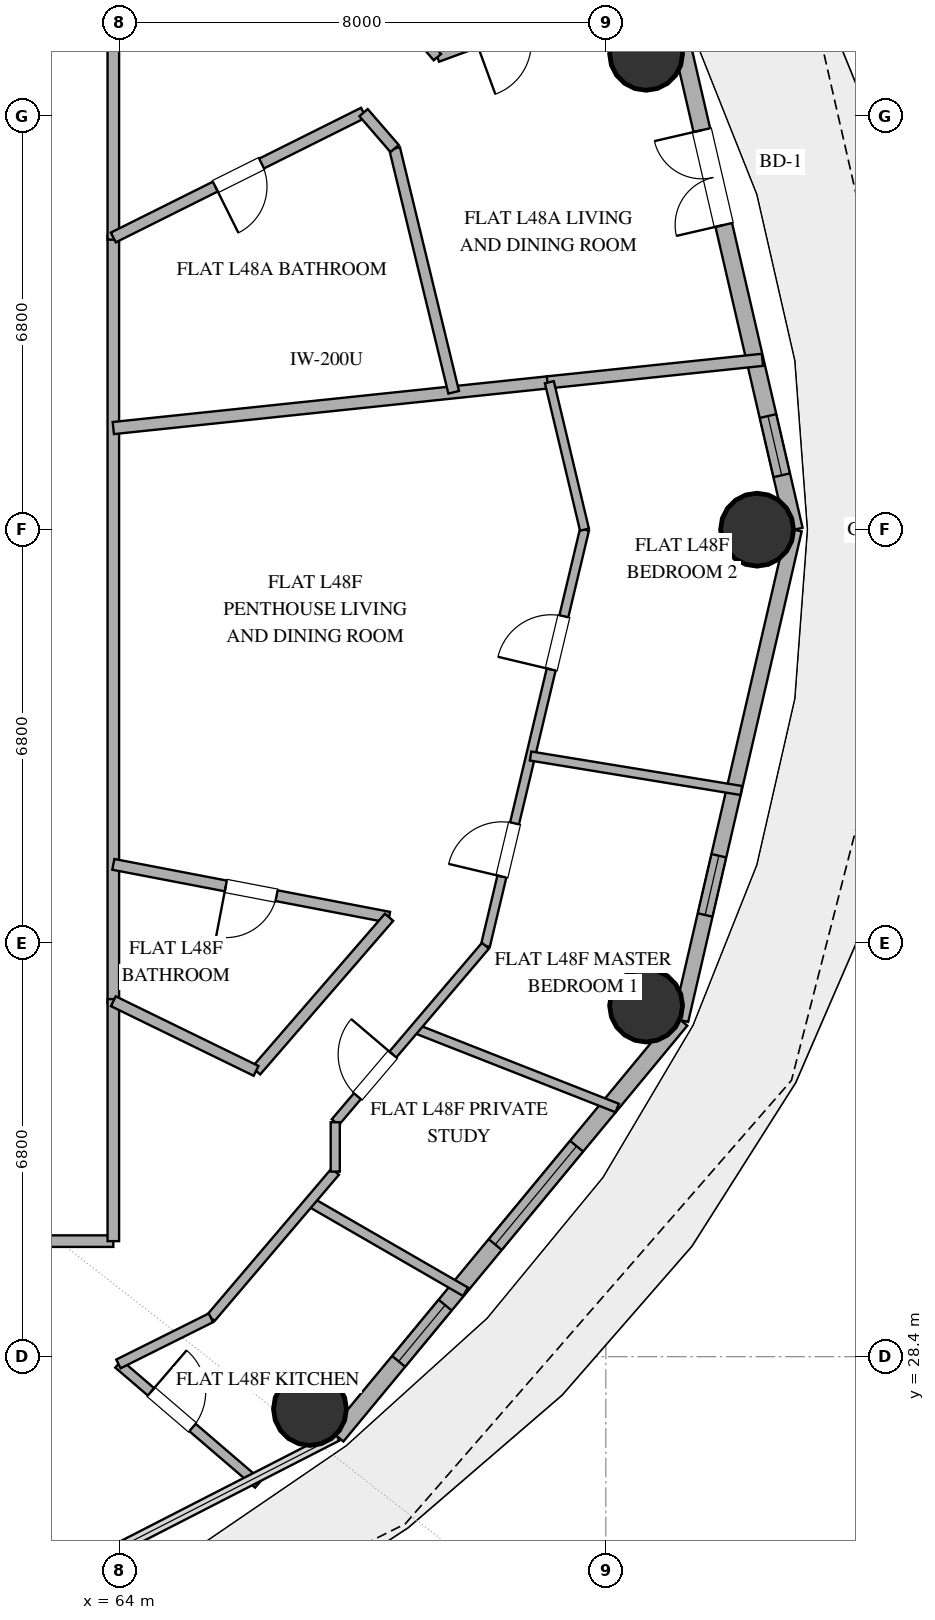
"""IFC4 building model, lengths in metres.
Left out: names, types, materials, properties, quantities, classifications, styles, units other than length and angle.
Written with IfcOpenShell. Run it as: python <this file> out.ifc"""

import sys

from ifc_helpers import new_model, si_unit, direction, frame, frame_2d, origin, origin_2d, place, context, subcontext, project, spatial, rectangle, hollow_circle, extrude, element, fill, save


model = new_model("IFC4")
c1 = context("Model", 3, precision=1e-05, world=origin(), true_north=direction((0.0, 1.0)))
c2 = subcontext(c1, "Body", "Model", "MODEL_VIEW")
j1 = project(units=[si_unit("LENGTHUNIT", "METRE"), si_unit("PLANEANGLEUNIT", "RADIAN")], contexts=[c1])
p1 = place(None, origin())
s1 = spatial("IfcSite", under=j1, at=p1, CompositionType="ELEMENT")
p2 = place(p1, origin())
s2 = spatial("IfcBuilding", under=s1, at=p2, CompositionType="ELEMENT")
p3 = place(p2, frame((0.0, 0.0, 190.2)))
s3 = spatial("IfcBuildingStorey", under=s2, at=p3, CompositionType="ELEMENT", Elevation=190.2)
for number, where, z_axis, x_axis in (
    (1, (74.487, 42.0, 0.0), (0.0, 0.0, 1.0), (1.0, 0.0, 0.0)),
    (2, (72.662, 49.826, 0.0), (0.0, 0.0, 1.0), (1.0, 0.0, 0.0)),
    (3, (67.134, 27.54, 0.0), (0.0, 0.0, 1.0), (1.0, 0.0, 0.0)),
    (4, (72.662, 34.174, 0.0), (0.0, 0.0, 1.0), (1.0, 0.0, 0.0)),
):
    element("IfcColumn", number, at=place(p3, frame(where, z_axis=z_axis, x_axis=x_axis)), inside=s3, PredefinedType="COLUMN", context=c2, shape_type="SweptSolid", body=[
        extrude(hollow_circle(Radius=0.6, WallThickness=0.032, at=origin_2d()), origin(), (0.0, 0.0, 1.0), 3.38),
    ])
p4 = place(p3, frame((75.099, 42.0, 0.0), z_axis=(0.0, 0.0, 1.0), x_axis=(-0.225473184558, 0.974249374157, 0.0)))
e5 = element("IfcWall", 5, at=p4, inside=s3, PredefinedType="SOLIDWALL", context=c2, shape_type="SweptSolid", body=[
    extrude(rectangle(XDim=8.28, YDim=0.28, at=frame_2d((4.14, 0.0))), origin(), (0.0, 0.0, 1.0), 3.38),
])
p5 = place(p4, frame((5.144, 0.0, 0.0)))
e6 = element("IfcOpeningElement", 6, at=p5, cuts=e5, PredefinedType="OPENING", context=c2, shape_type="SweptSolid", body=[
    extrude(rectangle(XDim=1.6, YDim=2.25, at=frame_2d((0.8, 1.125))), frame((0.0, 0.15, 0.0), z_axis=(0.0, -1.0, 0.0), x_axis=(1.0, 0.0, 0.0)), (0.0, 0.0, 1.0), 0.3),
])
p6 = place(p4, frame((0.918, 0.0, 0.85)))
e7 = element("IfcOpeningElement", 7, at=p6, cuts=e5, PredefinedType="OPENING", context=c2, shape_type="SweptSolid", body=[
    extrude(rectangle(XDim=1.0, YDim=1.8, at=frame_2d((0.5, 0.9))), frame((0.0, 0.15, 0.0), z_axis=(0.0, -1.0, 0.0), x_axis=(1.0, 0.0, 0.0)), (0.0, 0.0, 1.0), 0.3),
])
p7 = place(p3, frame((67.576, 27.094, 0.0), z_axis=(0.0, 0.0, 1.0), x_axis=(0.637333477683, 0.770588111915, 0.0)))
e8 = element("IfcWall", 8, at=p7, inside=s3, PredefinedType="SOLIDWALL", context=c2, shape_type="SweptSolid", body=[
    extrude(rectangle(XDim=8.875, YDim=0.28, at=frame_2d((4.438, 0.0))), origin(), (0.0, 0.0, 1.0), 3.38),
])
p8 = place(p7, frame((1.594, 0.0, 0.85)))
e9 = element("IfcOpeningElement", 9, at=p8, cuts=e8, PredefinedType="OPENING", context=c2, shape_type="SweptSolid", body=[
    extrude(rectangle(XDim=1.2, YDim=1.6, at=frame_2d((0.6, 0.8))), frame((0.0, 0.15, 0.0), z_axis=(0.0, -1.0, 0.0), x_axis=(1.0, 0.0, 0.0)), (0.0, 0.0, 1.0), 0.3),
])
p9 = place(p7, frame((4.087, 0.0, 0.85)))
e10 = element("IfcOpeningElement", 10, at=p9, cuts=e8, PredefinedType="OPENING", context=c2, shape_type="SweptSolid", body=[
    extrude(rectangle(XDim=2.1, YDim=2.2, at=frame_2d((1.05, 1.1))), frame((0.0, 0.15, 0.0), z_axis=(0.0, -1.0, 0.0), x_axis=(1.0, 0.0, 0.0)), (0.0, 0.0, 1.0), 0.3),
])
p10 = place(p3, frame((73.232, 33.933, 0.0), z_axis=(0.0, 0.0, 1.0), x_axis=(0.225473184558, 0.974249374157, 0.0)))
e11 = element("IfcWall", 11, at=p10, inside=s3, PredefinedType="SOLIDWALL", context=c2, shape_type="SweptSolid", body=[
    extrude(rectangle(XDim=8.28, YDim=0.25, at=frame_2d((4.14, 0.0))), origin(), (0.0, 0.0, 1.0), 3.38),
])
p11 = place(p10, frame((1.776, 0.0, 1.42)))
e12 = element("IfcOpeningElement", 12, at=p11, cuts=e11, PredefinedType="OPENING", context=c2, shape_type="SweptSolid", body=[
    extrude(rectangle(XDim=1.0, YDim=1.05, at=frame_2d((0.5, 0.525))), frame((0.0, 0.135, 0.0), z_axis=(0.0, -1.0, 0.0), x_axis=(1.0, 0.0, 0.0)), (0.0, 0.0, 1.0), 0.27),
])
p12 = place(p3, frame((41.743, 30.3, 0.0), z_axis=(0.0, 0.0, 1.0), x_axis=(1.0, 0.0, 0.0)))
e13 = element("IfcWall", 13, at=p12, inside=s3, PredefinedType="PARTITIONING", context=c2, shape_type="SweptSolid", body=[
    extrude(rectangle(XDim=22.157, YDim=0.19, at=frame_2d((11.079, 0.0))), origin(), (0.0, 0.0, 1.0), 2.74),
])
p13 = place(p12, frame((7.451, 0.0, 0.0)))
e14 = element("IfcOpeningElement", 14, at=p13, cuts=e13, PredefinedType="OPENING", context=c2, shape_type="SweptSolid", body=[
    extrude(rectangle(XDim=1.0, YDim=2.2, at=frame_2d((0.5, 1.1))), frame((0.0, 0.105, 0.0), z_axis=(0.0, -1.0, 0.0), x_axis=(1.0, 0.0, 0.0)), (0.0, 0.0, 1.0), 0.21),
])
p14 = place(p12, frame((17.344, 0.0, 0.0)))
e15 = element("IfcOpeningElement", 15, at=p14, cuts=e13, PredefinedType="OPENING", context=c2, shape_type="SweptSolid", body=[
    extrude(rectangle(XDim=1.0, YDim=2.2, at=frame_2d((0.5, 1.1))), frame((0.0, 0.105, 0.0), z_axis=(0.0, -1.0, 0.0), x_axis=(1.0, 0.0, 0.0)), (0.0, 0.0, 1.0), 0.21),
])
p15 = place(p3, frame((63.9, 46.841, 0.0), z_axis=(0.0, 0.0, 1.0), x_axis=(0.0, -1.0, 0.0)))
e16 = element("IfcWall", 16, at=p15, inside=s3, PredefinedType="PARTITIONING", context=c2, shape_type="SweptSolid", body=[
    extrude(rectangle(XDim=12.632, YDim=0.19, at=frame_2d((6.316, 0.0))), origin(), (0.0, 0.0, 1.0), 2.74),
])
p16 = place(p3, frame((63.9, 53.7, 0.0), z_axis=(0.0, 0.0, 1.0), x_axis=(0.0, -1.0, 0.0)))
e17 = element("IfcWall", 17, at=p16, inside=s3, PredefinedType="PARTITIONING", context=c2, shape_type="SweptSolid", body=[
    extrude(rectangle(XDim=6.931, YDim=0.19, at=frame_2d((3.465, 0.0))), origin(), (0.0, 0.0, 1.0), 2.74),
])
p17 = place(p3, frame((63.9, 43.671, 0.0), z_axis=(0.0, 0.0, 1.0), x_axis=(0.994523063153, 0.104517351942, 0.0)))
e18 = element("IfcWall", 18, at=p17, inside=s3, PredefinedType="PARTITIONING", context=c2, shape_type="SweptSolid", body=[
    extrude(rectangle(XDim=7.211, YDim=0.2, at=frame_2d((3.605, 0.0))), origin(), (0.0, 0.0, 1.0), 2.74),
])
p18 = place(p3, frame((68.435, 35.626, 0.0), z_axis=(0.0, 0.0, 1.0), x_axis=(-0.982105494501, 0.188331616227, 0.0)))
e19 = element("IfcWall", 19, at=p18, inside=s3, PredefinedType="PLUMBINGWALL", context=c2, shape_type="SweptSolid", body=[
    extrude(rectangle(XDim=4.617, YDim=0.18, at=frame_2d((2.309, 0.0))), origin(), (0.0, 0.0, 1.0), 2.74),
])
p19 = place(p18, frame((1.884, 0.0, 0.0)))
e20 = element("IfcOpeningElement", 20, at=p19, cuts=e19, PredefinedType="OPENING", context=c2, shape_type="SweptSolid", body=[
    extrude(rectangle(XDim=0.85, YDim=2.1, at=frame_2d((0.425, 1.05))), frame((0.0, 0.1, 0.0), z_axis=(0.0, -1.0, 0.0), x_axis=(1.0, 0.0, 0.0)), (0.0, 0.0, 1.0), 0.2),
])
p20 = place(p3, frame((68.016, 48.858, 0.0), z_axis=(0.0, 0.0, 1.0), x_axis=(-0.894872643331, -0.446321579377, 0.0)))
e21 = element("IfcWall", 21, at=p20, inside=s3, PredefinedType="PLUMBINGWALL", context=c2, shape_type="SweptSolid", body=[
    extrude(rectangle(XDim=4.599, YDim=0.18, at=frame_2d((2.3, 0.0))), origin(), (0.0, 0.0, 1.0), 2.74),
])
p21 = place(p20, frame((1.875, 0.0, 0.0)))
e22 = element("IfcOpeningElement", 22, at=p21, cuts=e21, PredefinedType="OPENING", context=c2, shape_type="SweptSolid", body=[
    extrude(rectangle(XDim=0.85, YDim=2.1, at=frame_2d((0.425, 1.05))), frame((0.0, 0.1, 0.0), z_axis=(0.0, -1.0, 0.0), x_axis=(1.0, 0.0, 0.0)), (0.0, 0.0, 1.0), 0.2),
])
p22 = place(p3, frame((69.498, 44.26, 0.0), z_axis=(0.0, 0.0, 1.0), x_axis=(-0.235510241151, 0.97187186723, 0.0)))
e23 = element("IfcWall", 23, at=p22, inside=s3, PredefinedType="PLUMBINGWALL", context=c2, shape_type="SweptSolid", body=[
    extrude(rectangle(XDim=4.125, YDim=0.18, at=frame_2d((2.062, 0.0))), origin(), (0.0, 0.0, 1.0), 2.74),
])
p23 = place(p3, frame((63.9, 34.281, 0.0), z_axis=(0.0, 0.0, 1.0), x_axis=(0.0, -1.0, 0.0)))
e24 = element("IfcWall", 24, at=p23, inside=s3, PredefinedType="PARTITIONING", context=c2, shape_type="SweptSolid", body=[
    extrude(rectangle(XDim=3.981, YDim=0.19, at=frame_2d((1.99, 0.0))), origin(), (0.0, 0.0, 1.0), 2.74),
])
p24 = place(p3, frame((70.019, 35.158, 0.0), z_axis=(0.0, 0.0, 1.0), x_axis=(0.231658068135, 0.972797275627, 0.0)))
e25 = element("IfcWall", 25, at=p24, inside=s3, PredefinedType="PARTITIONING", context=c2, shape_type="SweptSolid", body=[
    extrude(rectangle(XDim=7.034, YDim=0.15, at=frame_2d((3.517, 0.0))), origin(), (0.0, 0.0, 1.0), 2.74),
])
p25 = place(p24, frame((4.67, 0.0, 0.0)))
e26 = element("IfcOpeningElement", 26, at=p25, cuts=e25, PredefinedType="OPENING", context=c2, shape_type="SweptSolid", body=[
    extrude(rectangle(XDim=0.9, YDim=2.1, at=frame_2d((0.45, 1.05))), frame((0.0, 0.085, 0.0), z_axis=(0.0, -1.0, 0.0), x_axis=(1.0, 0.0, 0.0)), (0.0, 0.0, 1.0), 0.17),
])
p26 = place(p24, frame((1.17, 0.0, 0.0)))
e27 = element("IfcOpeningElement", 27, at=p26, cuts=e25, PredefinedType="OPENING", context=c2, shape_type="SweptSolid", body=[
    extrude(rectangle(XDim=0.9, YDim=2.1, at=frame_2d((0.45, 1.05))), frame((0.0, 0.085, 0.0), z_axis=(0.0, -1.0, 0.0), x_axis=(1.0, 0.0, 0.0)), (0.0, 0.0, 1.0), 0.17),
])
p27 = place(p3, frame((72.603, 51.006, 0.0), z_axis=(0.0, 0.0, 1.0), x_axis=(-0.939057046145, -0.343761347572, 0.0)))
e28 = element("IfcWall", 28, at=p27, inside=s3, PredefinedType="PLUMBINGWALL", context=c2, shape_type="SweptSolid", body=[
    extrude(rectangle(XDim=3.592, YDim=0.16, at=frame_2d((1.796, 0.0))), origin(), (0.0, 0.0, 1.0), 2.74),
])
p28 = place(p27, frame((2.006, 0.0, 0.0)))
e29 = element("IfcOpeningElement", 29, at=p28, cuts=e28, PredefinedType="OPENING", context=c2, shape_type="SweptSolid", body=[
    extrude(rectangle(XDim=0.9, YDim=2.1, at=frame_2d((0.45, 1.05))), frame((0.0, 0.09, 0.0), z_axis=(0.0, -1.0, 0.0), x_axis=(1.0, 0.0, 0.0)), (0.0, 0.0, 1.0), 0.18),
])
p29 = place(p3, frame((72.186, 32.49, 0.0), z_axis=(0.0, 0.0, 1.0), x_axis=(-0.930633495056, 0.365952589662, 0.0)))
e30 = element("IfcWall", 30, at=p29, inside=s3, PredefinedType="PARTITIONING", context=c2, shape_type="SweptSolid", body=[
    extrude(rectangle(XDim=3.573, YDim=0.15, at=frame_2d((1.786, 0.0))), origin(), (0.0, 0.0, 1.0), 2.74),
])
p30 = place(p3, frame((74.575, 44.793, 0.0), z_axis=(0.0, 0.0, 1.0), x_axis=(-0.994516359121, -0.104581123727, 0.0)))
e31 = element("IfcWall", 31, at=p30, inside=s3, PredefinedType="PARTITIONING", context=c2, shape_type="SweptSolid", body=[
    extrude(rectangle(XDim=3.555, YDim=0.2, at=frame_2d((1.778, 0.0))), origin(), (0.0, 0.0, 1.0), 2.74),
])
p31 = place(p3, frame((74.229, 37.711, 0.0), z_axis=(0.0, 0.0, 1.0), x_axis=(-0.98689451092, 0.161366738565, 0.0)))
e32 = element("IfcWall", 32, at=p31, inside=s3, PredefinedType="PARTITIONING", context=c2, shape_type="SweptSolid", body=[
    extrude(rectangle(XDim=3.513, YDim=0.15, at=frame_2d((1.757, 0.0))), origin(), (0.0, 0.0, 1.0), 2.74),
])
p32 = place(p3, frame((66.248, 33.1, 0.0), z_axis=(0.0, 0.0, 1.0), x_axis=(0.654579983518, 0.755992754712, 0.0)))
e33 = element("IfcWall", 33, at=p32, inside=s3, PredefinedType="PLUMBINGWALL", context=c2, shape_type="SweptSolid", body=[
    extrude(rectangle(XDim=3.342, YDim=0.18, at=frame_2d((1.671, 0.0))), origin(), (0.0, 0.0, 1.0), 2.74),
])
p33 = place(p3, frame((63.984, 28.281, 0.0), z_axis=(0.0, 0.0, 1.0), x_axis=(0.758829970644, -0.651288780537, 0.0)))
e34 = element("IfcWall", 34, at=p33, inside=s3, PredefinedType="PLUMBINGWALL", context=c2, shape_type="SweptSolid", body=[
    extrude(rectangle(XDim=3.031, YDim=0.16, at=frame_2d((1.515, 0.0))), origin(), (0.0, 0.0, 1.0), 2.74),
])
p34 = place(p33, frame((0.705, 0.0, 0.0)))
e35 = element("IfcOpeningElement", 35, at=p34, cuts=e34, PredefinedType="OPENING", context=c2, shape_type="SweptSolid", body=[
    extrude(rectangle(XDim=0.9, YDim=2.1, at=frame_2d((0.45, 1.05))), frame((0.0, 0.09, 0.0), z_axis=(0.0, -1.0, 0.0), x_axis=(1.0, 0.0, 0.0)), (0.0, 0.0, 1.0), 0.18),
])
p35 = place(p3, frame((69.693, 29.468, 0.0), z_axis=(0.0, 0.0, 1.0), x_axis=(-0.865888886841, 0.500236379769, 0.0)))
e36 = element("IfcWall", 36, at=p35, inside=s3, PredefinedType="PLUMBINGWALL", context=c2, shape_type="SweptSolid", body=[
    extrude(rectangle(XDim=2.96, YDim=0.16, at=frame_2d((1.48, 0.0))), origin(), (0.0, 0.0, 1.0), 2.74),
])
p36 = place(p3, frame((63.9, 34.245, 0.0), z_axis=(0.0, 0.0, 1.0), x_axis=(0.898795393126, -0.438368385374, 0.0)))
e37 = element("IfcWall", 37, at=p36, inside=s3, PredefinedType="PLUMBINGWALL", context=c2, shape_type="SweptSolid", body=[
    extrude(rectangle(XDim=2.612, YDim=0.18, at=frame_2d((1.306, 0.0))), origin(), (0.0, 0.0, 1.0), 2.74),
])
p37 = place(p3, frame((69.229, 49.771, 0.0), z_axis=(0.0, 0.0, 1.0), x_axis=(-0.648055845939, 0.761592818076, 0.0)))
e38 = element("IfcWall", 38, at=p37, inside=s3, PredefinedType="PLUMBINGWALL", context=c2, shape_type="SweptSolid", body=[
    extrude(rectangle(XDim=2.591, YDim=0.16, at=frame_2d((1.295, 0.0))), origin(), (0.0, 0.0, 1.0), 2.74),
])
p38 = place(p3, frame((67.55, 31.443, 0.0), z_axis=(0.0, 0.0, 1.0), x_axis=(-0.647888606369, -0.761735094201, 0.0)))
e39 = element("IfcWall", 39, at=p38, inside=s3, PredefinedType="PLUMBINGWALL", context=c2, shape_type="SweptSolid", body=[
    extrude(rectangle(XDim=3.157, YDim=0.16, at=frame_2d((1.578, 0.0))), origin(), (0.0, 0.0, 1.0), 2.74),
])
p39 = place(p3, frame((71.649, 42.0, 0.0), z_axis=(0.0, 0.0, 1.0), x_axis=(-0.231642596653, 0.972800959814, 0.0)))
e40 = element("IfcWall", 40, at=p39, inside=s3, PredefinedType="PARTITIONING", context=c2, shape_type="SweptSolid", body=[
    extrude(rectangle(XDim=2.493, YDim=0.15, at=frame_2d((1.246, 0.0))), origin(), (0.0, 0.0, 1.0), 2.74),
])
p40 = place(p3, frame((67.55, 32.256, 0.0), z_axis=(0.0, 0.0, 1.0), x_axis=(0.648059335437, 0.761589848773, 0.0)))
e41 = element("IfcWall", 41, at=p40, inside=s3, PredefinedType="PARTITIONING", context=c2, shape_type="SweptSolid", body=[
    extrude(rectangle(XDim=3.811, YDim=0.15, at=frame_2d((1.905, 0.0))), origin(), (0.0, 0.0, 1.0), 2.74),
])
p41 = place(p40, frame((0.562, 0.0, 0.0)))
e42 = element("IfcOpeningElement", 42, at=p41, cuts=e41, PredefinedType="OPENING", context=c2, shape_type="SweptSolid", body=[
    extrude(rectangle(XDim=0.9, YDim=2.1, at=frame_2d((0.45, 1.05))), frame((0.0, 0.085, 0.0), z_axis=(0.0, -1.0, 0.0), x_axis=(1.0, 0.0, 0.0)), (0.0, 0.0, 1.0), 0.17),
])
p42 = place(p3, frame((65.505, 29.039, 0.0), z_axis=(0.0, 0.0, 1.0), x_axis=(-0.894972502213, -0.44612130669, 0.0)))
e43 = element("IfcWall", 43, at=p42, inside=s3, PredefinedType="PLUMBINGWALL", context=c2, shape_type="SweptSolid", body=[
    extrude(rectangle(XDim=1.699, YDim=0.16, at=frame_2d((0.85, 0.0))), origin(), (0.0, 0.0, 1.0), 2.74),
])
p43 = place(p3, frame((67.55, 31.443, 0.0), z_axis=(0.0, 0.0, 1.0), x_axis=(0.0, 1.0, 0.0)))
e44 = element("IfcWall", 44, at=p43, inside=s3, PredefinedType="PARTITIONING", context=c2, shape_type="SweptSolid", body=[
    extrude(rectangle(XDim=0.812, YDim=0.15, at=frame_2d((0.406, 0.0))), origin(), (0.0, 0.0, 1.0), 2.74),
])
p44 = place(p3, frame((68.526, 48.268, 0.0), z_axis=(0.0, 0.0, 1.0), x_axis=(-0.654572928685, 0.755998863116, 0.0)))
e45 = element("IfcWall", 45, at=p44, inside=s3, PredefinedType="PLUMBINGWALL", context=c2, shape_type="SweptSolid", body=[
    extrude(rectangle(XDim=0.78, YDim=0.18, at=frame_2d((0.39, 0.0))), origin(), (0.0, 0.0, 1.0), 2.74),
])
p45 = place(p5, origin())
e46 = element("IfcDoor", 46, at=p45, inside=s3, OperationType="DOUBLE_DOOR_SINGLE_SWING", PredefinedType="DOOR", context=c2, shape_type="SweptSolid", body=[
    extrude(rectangle(XDim=1.6, YDim=2.25, at=frame_2d((0.8, 1.125))), frame((0.0, 0.025, 0.0), z_axis=(0.0, -1.0, 0.0), x_axis=(1.0, 0.0, 0.0)), (0.0, 0.0, 1.0), 0.05),
])
fill(e6, e46)
p46 = place(p8, origin())
e47 = element("IfcWindow", 47, at=p46, inside=s3, PartitioningType="SINGLE_PANEL", PredefinedType="WINDOW", context=c2, shape_type="SweptSolid", body=[
    extrude(rectangle(XDim=1.2, YDim=1.6, at=frame_2d((0.6, 0.8))), frame((0.0, 0.03, 0.0), z_axis=(0.0, -1.0, 0.0), x_axis=(1.0, 0.0, 0.0)), (0.0, 0.0, 1.0), 0.06),
])
fill(e9, e47)
p47 = place(p9, origin())
e48 = element("IfcWindow", 48, at=p47, inside=s3, PartitioningType="SINGLE_PANEL", PredefinedType="WINDOW", context=c2, shape_type="SweptSolid", body=[
    extrude(rectangle(XDim=2.1, YDim=2.2, at=frame_2d((1.05, 1.1))), frame((0.0, 0.03, 0.0), z_axis=(0.0, -1.0, 0.0), x_axis=(1.0, 0.0, 0.0)), (0.0, 0.0, 1.0), 0.06),
])
fill(e10, e48)
p48 = place(p11, origin())
e49 = element("IfcWindow", 49, at=p48, inside=s3, PartitioningType="SINGLE_PANEL", PredefinedType="WINDOW", context=c2, shape_type="SweptSolid", body=[
    extrude(rectangle(XDim=1.0, YDim=1.05, at=frame_2d((0.5, 0.525))), frame((0.0, 0.03, 0.0), z_axis=(0.0, -1.0, 0.0), x_axis=(1.0, 0.0, 0.0)), (0.0, 0.0, 1.0), 0.06),
])
fill(e12, e49)
p49 = place(p6, origin())
e50 = element("IfcWindow", 50, at=p49, inside=s3, PartitioningType="SINGLE_PANEL", PredefinedType="WINDOW", context=c2, shape_type="SweptSolid", body=[
    extrude(rectangle(XDim=1.0, YDim=1.8, at=frame_2d((0.5, 0.9))), frame((0.0, 0.03, 0.0), z_axis=(0.0, -1.0, 0.0), x_axis=(1.0, 0.0, 0.0)), (0.0, 0.0, 1.0), 0.06),
])
fill(e7, e50)
p50 = place(p19, origin())
e51 = element("IfcDoor", 51, at=p50, inside=s3, OperationType="SINGLE_SWING_RIGHT", PredefinedType="DOOR", context=c2, shape_type="SweptSolid", body=[
    extrude(rectangle(XDim=0.85, YDim=2.1, at=frame_2d((0.425, 1.05))), frame((0.0, 0.025, 0.0), z_axis=(0.0, -1.0, 0.0), x_axis=(1.0, 0.0, 0.0)), (0.0, 0.0, 1.0), 0.05),
])
fill(e20, e51)
p51 = place(p21, origin())
e52 = element("IfcDoor", 52, at=p51, inside=s3, OperationType="SINGLE_SWING_RIGHT", PredefinedType="DOOR", context=c2, shape_type="SweptSolid", body=[
    extrude(rectangle(XDim=0.85, YDim=2.1, at=frame_2d((0.425, 1.05))), frame((0.0, 0.025, 0.0), z_axis=(0.0, -1.0, 0.0), x_axis=(1.0, 0.0, 0.0)), (0.0, 0.0, 1.0), 0.05),
])
fill(e22, e52)
p52 = place(p25, origin())
e53 = element("IfcDoor", 53, at=p52, inside=s3, OperationType="SINGLE_SWING_LEFT", PredefinedType="DOOR", context=c2, shape_type="SweptSolid", body=[
    extrude(rectangle(XDim=0.9, YDim=2.1, at=frame_2d((0.45, 1.05))), frame((0.0, 0.025, 0.0), z_axis=(0.0, -1.0, 0.0), x_axis=(1.0, 0.0, 0.0)), (0.0, 0.0, 1.0), 0.05),
])
fill(e26, e53)
p53 = place(p26, origin())
e54 = element("IfcDoor", 54, at=p53, inside=s3, OperationType="SINGLE_SWING_LEFT", PredefinedType="DOOR", context=c2, shape_type="SweptSolid", body=[
    extrude(rectangle(XDim=0.9, YDim=2.1, at=frame_2d((0.45, 1.05))), frame((0.0, 0.025, 0.0), z_axis=(0.0, -1.0, 0.0), x_axis=(1.0, 0.0, 0.0)), (0.0, 0.0, 1.0), 0.05),
])
fill(e27, e54)
p54 = place(p34, origin())
e55 = element("IfcDoor", 55, at=p54, inside=s3, OperationType="SINGLE_SWING_LEFT", PredefinedType="DOOR", context=c2, shape_type="SweptSolid", body=[
    extrude(rectangle(XDim=0.9, YDim=2.1, at=frame_2d((0.45, 1.05))), frame((0.0, 0.025, 0.0), z_axis=(0.0, -1.0, 0.0), x_axis=(1.0, 0.0, 0.0)), (0.0, 0.0, 1.0), 0.05),
])
fill(e35, e55)
p55 = place(p41, origin())
e56 = element("IfcDoor", 56, at=p55, inside=s3, OperationType="SINGLE_SWING_RIGHT", PredefinedType="DOOR", context=c2, shape_type="SweptSolid", body=[
    extrude(rectangle(XDim=0.9, YDim=2.1, at=frame_2d((0.45, 1.05))), frame((0.0, 0.025, 0.0), z_axis=(0.0, -1.0, 0.0), x_axis=(1.0, 0.0, 0.0)), (0.0, 0.0, 1.0), 0.05),
])
fill(e42, e56)
save(model, sys.argv[1])
